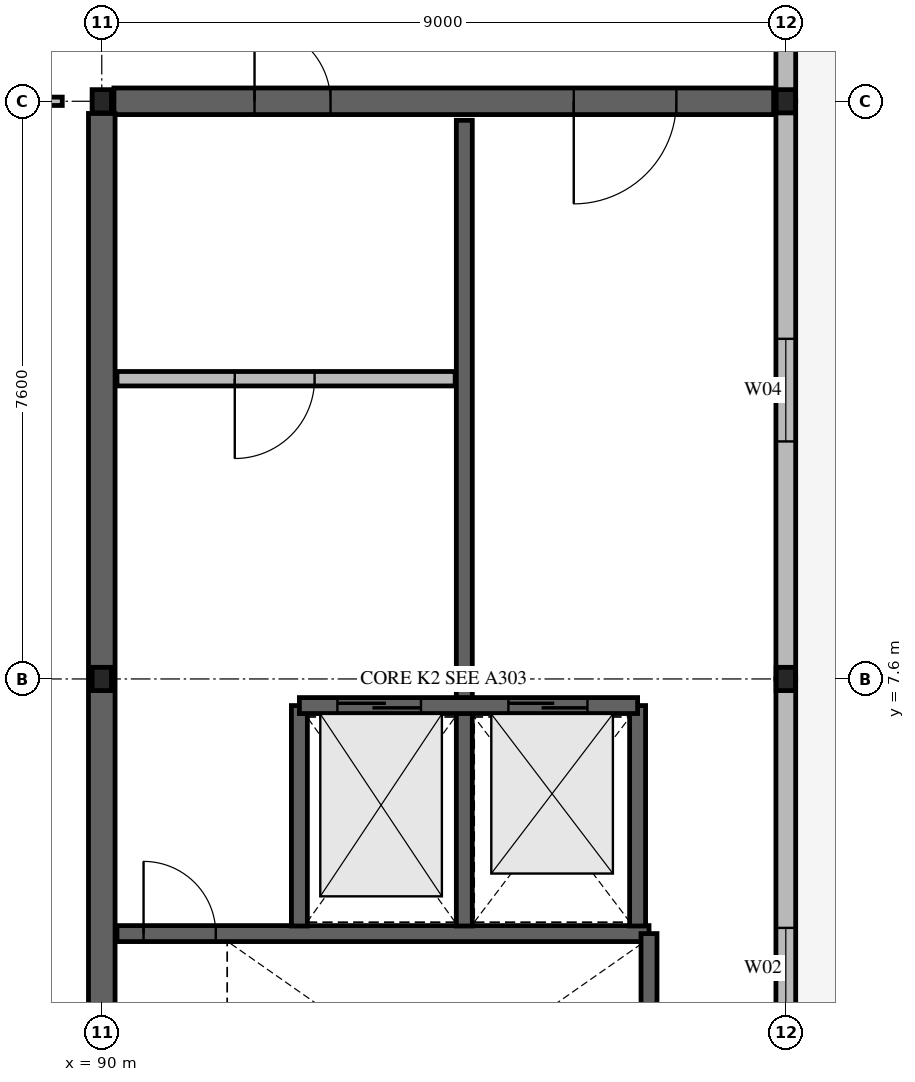
"""IFC4 building model, lengths in metres.
Left out: names, types, materials, properties, quantities, classifications, styles, units other than length and angle.
Written with IfcOpenShell. Run it as: python <this file> out.ifc"""

import sys

from ifc_helpers import new_model, si_unit, direction, frame, frame_2d, origin, origin_2d, place, context, subcontext, project, spatial, rectangle, i_section, extrude, element, fill, save


model = new_model("IFC4")
c1 = context("Model", 3, precision=1e-05, world=origin(), true_north=direction((0.0, 1.0)))
c2 = subcontext(c1, "Body", "Model", "MODEL_VIEW")
j1 = project(units=[si_unit("LENGTHUNIT", "METRE"), si_unit("PLANEANGLEUNIT", "RADIAN")], contexts=[c1])
p1 = place(None, origin())
s1 = spatial("IfcSite", under=j1, at=p1, CompositionType="ELEMENT")
p2 = place(p1, origin())
s2 = spatial("IfcBuilding", under=s1, at=p2, CompositionType="ELEMENT")
p3 = place(p2, frame((0.0, 0.0, 22.32)))
s3 = spatial("IfcBuildingStorey", under=s2, at=p3, CompositionType="ELEMENT", Elevation=22.32)
for number, where, z_axis, x_axis in (
    (1, (90.0, 7.6, 0.0), (0.0, 0.0, 1.0), (1.0, 0.0, 0.0)),
    (2, (90.0, 15.2, 0.0), (0.0, 0.0, 1.0), (1.0, 0.0, 0.0)),
    (3, (99.0, 7.6, 0.0), (0.0, 0.0, 1.0), (1.0, 0.0, 0.0)),
    (4, (99.0, 15.2, 0.0), (0.0, 0.0, 1.0), (1.0, 0.0, 0.0)),
):
    element("IfcColumn", number, at=place(p3, frame(where, z_axis=z_axis, x_axis=x_axis)), inside=s3, PredefinedType="COLUMN", context=c2, shape_type="SweptSolid", body=[
        extrude(i_section(OverallWidth=0.254, OverallDepth=0.306, WebThickness=0.009, FlangeThickness=0.015, FilletRadius=0.015, at=origin_2d()), origin(), (0.0, 0.0, 1.0), 4.32),
    ])
p4 = place(p3, frame((99.0, 0.0, 0.0), z_axis=(0.0, 0.0, 1.0), x_axis=(0.0, 1.0, 0.0)))
e5 = element("IfcWall", 5, at=p4, inside=s3, PredefinedType="STANDARD", context=c2, shape_type="SweptSolid", body=[
    extrude(rectangle(XDim=7.6, YDim=0.26, at=frame_2d((3.8, 0.0))), origin(), (0.0, 0.0, 1.0), 3.559),
])
p5 = place(p4, frame((3.275, 0.0, 0.85)))
e6 = element("IfcOpeningElement", 6, at=p5, cuts=e5, PredefinedType="OPENING", context=c2, shape_type="SweptSolid", body=[
    extrude(rectangle(XDim=1.05, YDim=1.2, at=frame_2d((0.525, 0.6))), frame((0.0, 0.14, 0.0), z_axis=(0.0, -1.0, 0.0), x_axis=(1.0, 0.0, 0.0)), (0.0, 0.0, 1.0), 0.28),
])
p6 = place(p3, frame((99.0, 7.6, 0.0), z_axis=(0.0, 0.0, 1.0), x_axis=(0.0, 1.0, 0.0)))
e7 = element("IfcWall", 7, at=p6, inside=s3, PredefinedType="STANDARD", context=c2, shape_type="SweptSolid", body=[
    extrude(rectangle(XDim=7.6, YDim=0.26, at=frame_2d((3.8, 0.0))), origin(), (0.0, 0.0, 1.0), 3.559),
])
p7 = place(p6, frame((3.125, 0.0, 0.85)))
e8 = element("IfcOpeningElement", 8, at=p7, cuts=e7, PredefinedType="OPENING", context=c2, shape_type="SweptSolid", body=[
    extrude(rectangle(XDim=1.35, YDim=1.2, at=frame_2d((0.675, 0.6))), frame((0.0, 0.14, 0.0), z_axis=(0.0, -1.0, 0.0), x_axis=(1.0, 0.0, 0.0)), (0.0, 0.0, 1.0), 0.28),
])
p8 = place(p3, frame((99.0, 15.2, 0.0), z_axis=(0.0, 0.0, 1.0), x_axis=(0.0, 1.0, 0.0)))
e9 = element("IfcWall", 9, at=p8, inside=s3, PredefinedType="STANDARD", context=c2, shape_type="SweptSolid", body=[
    extrude(rectangle(XDim=7.81, YDim=0.26, at=frame_2d((3.905, 0.0))), origin(), (0.0, 0.0, 1.0), 3.559),
])
p9 = place(p8, frame((2.89, 0.0, 0.0)))
e10 = element("IfcOpeningElement", 10, at=p9, cuts=e9, PredefinedType="OPENING", context=c2, shape_type="SweptSolid", body=[
    extrude(rectangle(XDim=1.82, YDim=2.2, at=frame_2d((0.91, 1.1))), frame((0.0, 0.14, 0.0), z_axis=(0.0, -1.0, 0.0), x_axis=(1.0, 0.0, 0.0)), (0.0, 0.0, 1.0), 0.28),
])
p10 = place(p3, frame((90.16, 15.2, 0.0), z_axis=(0.0, 0.0, 1.0), x_axis=(1.0, 0.0, 0.0)))
e11 = element("IfcWall", 11, at=p10, inside=s3, PredefinedType="SHEAR", context=c2, shape_type="SweptSolid", body=[
    extrude(rectangle(XDim=8.68, YDim=0.35, at=frame_2d((4.34, 0.0))), origin(), (0.0, 0.0, 1.0), 4.04),
])
p11 = place(p10, frame((1.85, 0.0, 0.0)))
e12 = element("IfcOpeningElement", 12, at=p11, cuts=e11, PredefinedType="OPENING", context=c2, shape_type="SweptSolid", body=[
    extrude(rectangle(XDim=1.0, YDim=2.15, at=frame_2d((0.5, 1.075))), frame((0.0, 0.185, 0.0), z_axis=(0.0, -1.0, 0.0), x_axis=(1.0, 0.0, 0.0)), (0.0, 0.0, 1.0), 0.37),
])
p12 = place(p10, frame((6.05, 0.0, 0.0)))
e13 = element("IfcOpeningElement", 13, at=p12, cuts=e11, PredefinedType="OPENING", context=c2, shape_type="SweptSolid", body=[
    extrude(rectangle(XDim=1.35, YDim=2.18, at=frame_2d((0.675, 1.09))), frame((0.0, 0.185, 0.0), z_axis=(0.0, -1.0, 0.0), x_axis=(1.0, 0.0, 0.0)), (0.0, 0.0, 1.0), 0.37),
])
p13 = place(p3, frame((90.0, 0.16, 0.0), z_axis=(0.0, 0.0, 1.0), x_axis=(0.0, 1.0, 0.0)))
e14 = element("IfcWall", 14, at=p13, inside=s3, PredefinedType="SHEAR", context=c2, shape_type="SweptSolid", body=[
    extrude(rectangle(XDim=14.88, YDim=0.35, at=frame_2d((7.44, 0.0))), origin(), (0.0, 0.0, 1.0), 4.04),
])
p14 = place(p3, frame((90.2, 4.25, 0.0), z_axis=(0.0, 0.0, 1.0), x_axis=(1.0, 0.0, 0.0)))
e15 = element("IfcWall", 15, at=p14, inside=s3, PredefinedType="SOLIDWALL", context=c2, shape_type="SweptSolid", body=[
    extrude(rectangle(XDim=7.0, YDim=0.21, at=frame_2d((3.5, 0.0))), origin(), (0.0, 0.0, 1.0), 4.04),
])
p15 = place(p14, frame((0.35, 0.0, 0.0)))
e16 = element("IfcOpeningElement", 16, at=p15, cuts=e15, PredefinedType="OPENING", context=c2, shape_type="SweptSolid", body=[
    extrude(rectangle(XDim=0.95, YDim=2.12, at=frame_2d((0.475, 1.06))), frame((0.0, 0.115, 0.0), z_axis=(0.0, -1.0, 0.0), x_axis=(1.0, 0.0, 0.0)), (0.0, 0.0, 1.0), 0.23),
])
p16 = place(p3, frame((97.2, 0.2, 0.0), z_axis=(0.0, 0.0, 1.0), x_axis=(0.0, 1.0, 0.0)))
e17 = element("IfcWall", 17, at=p16, inside=s3, PredefinedType="SOLIDWALL", context=c2, shape_type="SweptSolid", body=[
    extrude(rectangle(XDim=4.05, YDim=0.21, at=frame_2d((2.025, 0.0))), origin(), (0.0, 0.0, 1.0), 4.04),
])
p17 = place(p3, frame((92.6, 4.35, 0.0), z_axis=(0.0, 0.0, 1.0), x_axis=(0.0, 1.0, 0.0)))
e18 = element("IfcWall", 18, at=p17, inside=s3, PredefinedType="SOLIDWALL", context=c2, shape_type="SweptSolid", body=[
    extrude(rectangle(XDim=2.9, YDim=0.21, at=frame_2d((1.45, 0.0))), origin(), (0.0, 0.0, 1.0), 4.04),
])
p18 = place(p3, frame((94.77, 4.35, 0.0), z_axis=(0.0, 0.0, 1.0), x_axis=(0.0, 1.0, 0.0)))
e19 = element("IfcWall", 19, at=p18, inside=s3, PredefinedType="SOLIDWALL", context=c2, shape_type="SweptSolid", body=[
    extrude(rectangle(XDim=10.6, YDim=0.21, at=frame_2d((5.3, 0.0))), origin(), (0.0, 0.0, 1.0), 4.04),
])
p19 = place(p3, frame((97.05, 4.35, 0.0), z_axis=(0.0, 0.0, 1.0), x_axis=(0.0, 1.0, 0.0)))
e20 = element("IfcWall", 20, at=p19, inside=s3, PredefinedType="SOLIDWALL", context=c2, shape_type="SweptSolid", body=[
    extrude(rectangle(XDim=2.9, YDim=0.21, at=frame_2d((1.45, 0.0))), origin(), (0.0, 0.0, 1.0), 4.04),
])
p20 = place(p3, frame((92.6, 7.25, 0.0), z_axis=(0.0, 0.0, 1.0), x_axis=(1.0, 0.0, 0.0)))
e21 = element("IfcWall", 21, at=p20, inside=s3, PredefinedType="SOLIDWALL", context=c2, shape_type="SweptSolid", body=[
    extrude(rectangle(XDim=4.45, YDim=0.21, at=frame_2d((2.225, 0.0))), origin(), (0.0, 0.0, 1.0), 4.04),
])
p21 = place(p20, frame((0.5, 0.0, 0.0)))
e22 = element("IfcOpeningElement", 22, at=p21, cuts=e21, PredefinedType="OPENING", context=c2, shape_type="SweptSolid", body=[
    extrude(rectangle(XDim=1.1, YDim=2.14, at=frame_2d((0.55, 1.07))), frame((0.0, 0.115, 0.0), z_axis=(0.0, -1.0, 0.0), x_axis=(1.0, 0.0, 0.0)), (0.0, 0.0, 1.0), 0.23),
])
p22 = place(p20, frame((2.75, 0.0, 0.0)))
e23 = element("IfcOpeningElement", 23, at=p22, cuts=e21, PredefinedType="OPENING", context=c2, shape_type="SweptSolid", body=[
    extrude(rectangle(XDim=1.04, YDim=2.1, at=frame_2d((0.52, 1.05))), frame((0.0, 0.115, 0.0), z_axis=(0.0, -1.0, 0.0), x_axis=(1.0, 0.0, 0.0)), (0.0, 0.0, 1.0), 0.23),
])
p23 = place(p3, frame((90.2, 11.55, 0.0), z_axis=(0.0, 0.0, 1.0), x_axis=(1.0, 0.0, 0.0)))
e24 = element("IfcWall", 24, at=p23, inside=s3, PredefinedType="SOLIDWALL", context=c2, shape_type="SweptSolid", body=[
    extrude(rectangle(XDim=4.45, YDim=0.19, at=frame_2d((2.225, 0.0))), origin(), (0.0, 0.0, 1.0), 4.04),
])
p24 = place(p23, frame((1.55, 0.0, 0.0)))
e25 = element("IfcOpeningElement", 25, at=p24, cuts=e24, PredefinedType="OPENING", context=c2, shape_type="SweptSolid", body=[
    extrude(rectangle(XDim=1.05, YDim=2.12, at=frame_2d((0.525, 1.06))), frame((0.0, 0.105, 0.0), z_axis=(0.0, -1.0, 0.0), x_axis=(1.0, 0.0, 0.0)), (0.0, 0.0, 1.0), 0.21),
])
p25 = place(p3, frame((81.52, 15.2, 0.0), z_axis=(0.0, 0.0, 1.0), x_axis=(1.0, 0.0, 0.0)))
e26 = element("IfcWall", 26, at=p25, inside=s3, PredefinedType="PARTITIONING", context=c2, shape_type="SweptSolid", body=[
    extrude(rectangle(XDim=7.96, YDim=0.11, at=frame_2d((3.98, 0.0))), origin(), (0.0, 0.0, 1.0), 3.484),
])
p26 = place(p25, frame((3.11, 0.0, 0.0)))
e27 = element("IfcOpeningElement", 27, at=p26, cuts=e26, PredefinedType="OPENING", context=c2, shape_type="SweptSolid", body=[
    extrude(rectangle(XDim=1.74, YDim=2.1, at=frame_2d((0.87, 1.05))), frame((0.0, 0.065, 0.0), z_axis=(0.0, -1.0, 0.0), x_axis=(1.0, 0.0, 0.0)), (0.0, 0.0, 1.0), 0.13),
])
p27 = place(p5, origin())
e28 = element("IfcWindow", 28, at=p27, inside=s3, PartitioningType="SINGLE_PANEL", PredefinedType="WINDOW", context=c2, shape_type="SweptSolid", body=[
    extrude(rectangle(XDim=1.05, YDim=1.2, at=frame_2d((0.525, 0.6))), frame((0.0, 0.03, 0.0), z_axis=(0.0, -1.0, 0.0), x_axis=(1.0, 0.0, 0.0)), (0.0, 0.0, 1.0), 0.06),
])
fill(e6, e28)
p28 = place(p7, origin())
e29 = element("IfcWindow", 29, at=p28, inside=s3, PartitioningType="SINGLE_PANEL", PredefinedType="WINDOW", context=c2, shape_type="SweptSolid", body=[
    extrude(rectangle(XDim=1.35, YDim=1.2, at=frame_2d((0.675, 0.6))), frame((0.0, 0.03, 0.0), z_axis=(0.0, -1.0, 0.0), x_axis=(1.0, 0.0, 0.0)), (0.0, 0.0, 1.0), 0.06),
])
fill(e8, e29)
p29 = place(p15, origin())
e30 = element("IfcDoor", 30, at=p29, inside=s3, OperationType="SINGLE_SWING_LEFT", PredefinedType="DOOR", context=c2, shape_type="SweptSolid", body=[
    extrude(rectangle(XDim=0.95, YDim=2.12, at=frame_2d((0.475, 1.06))), frame((0.0, 0.025, 0.0), z_axis=(0.0, -1.0, 0.0), x_axis=(1.0, 0.0, 0.0)), (0.0, 0.0, 1.0), 0.05),
])
fill(e16, e30)
p30 = place(p21, origin())
e31 = element("IfcDoor", 31, at=p30, inside=s3, OperationType="SLIDING_TO_LEFT", PredefinedType="DOOR", context=c2, shape_type="SweptSolid", body=[
    extrude(rectangle(XDim=1.1, YDim=2.14, at=frame_2d((0.55, 1.07))), frame((0.0, 0.025, 0.0), z_axis=(0.0, -1.0, 0.0), x_axis=(1.0, 0.0, 0.0)), (0.0, 0.0, 1.0), 0.05),
])
fill(e22, e31)
p31 = place(p22, origin())
e32 = element("IfcDoor", 32, at=p31, inside=s3, OperationType="SLIDING_TO_LEFT", PredefinedType="DOOR", context=c2, shape_type="SweptSolid", body=[
    extrude(rectangle(XDim=1.04, YDim=2.1, at=frame_2d((0.52, 1.05))), frame((0.0, 0.025, 0.0), z_axis=(0.0, -1.0, 0.0), x_axis=(1.0, 0.0, 0.0)), (0.0, 0.0, 1.0), 0.05),
])
fill(e23, e32)
p32 = place(p24, origin())
e33 = element("IfcDoor", 33, at=p32, inside=s3, OperationType="SINGLE_SWING_RIGHT", PredefinedType="DOOR", context=c2, shape_type="SweptSolid", body=[
    extrude(rectangle(XDim=1.05, YDim=2.12, at=frame_2d((0.525, 1.06))), frame((0.0, 0.025, 0.0), z_axis=(0.0, -1.0, 0.0), x_axis=(1.0, 0.0, 0.0)), (0.0, 0.0, 1.0), 0.05),
])
fill(e25, e33)
p33 = place(p11, origin())
e34 = element("IfcDoor", 34, at=p33, inside=s3, OperationType="SINGLE_SWING_LEFT", PredefinedType="DOOR", context=c2, shape_type="SweptSolid", body=[
    extrude(rectangle(XDim=1.0, YDim=2.15, at=frame_2d((0.5, 1.075))), frame((0.0, 0.025, 0.0), z_axis=(0.0, -1.0, 0.0), x_axis=(1.0, 0.0, 0.0)), (0.0, 0.0, 1.0), 0.05),
])
fill(e12, e34)
p34 = place(p12, origin())
e35 = element("IfcDoor", 35, at=p34, inside=s3, OperationType="SINGLE_SWING_RIGHT", PredefinedType="DOOR", context=c2, shape_type="SweptSolid", body=[
    extrude(rectangle(XDim=1.35, YDim=2.18, at=frame_2d((0.675, 1.09))), frame((0.0, 0.025, 0.0), z_axis=(0.0, -1.0, 0.0), x_axis=(1.0, 0.0, 0.0)), (0.0, 0.0, 1.0), 0.05),
])
fill(e13, e35)
save(model, sys.argv[1])
